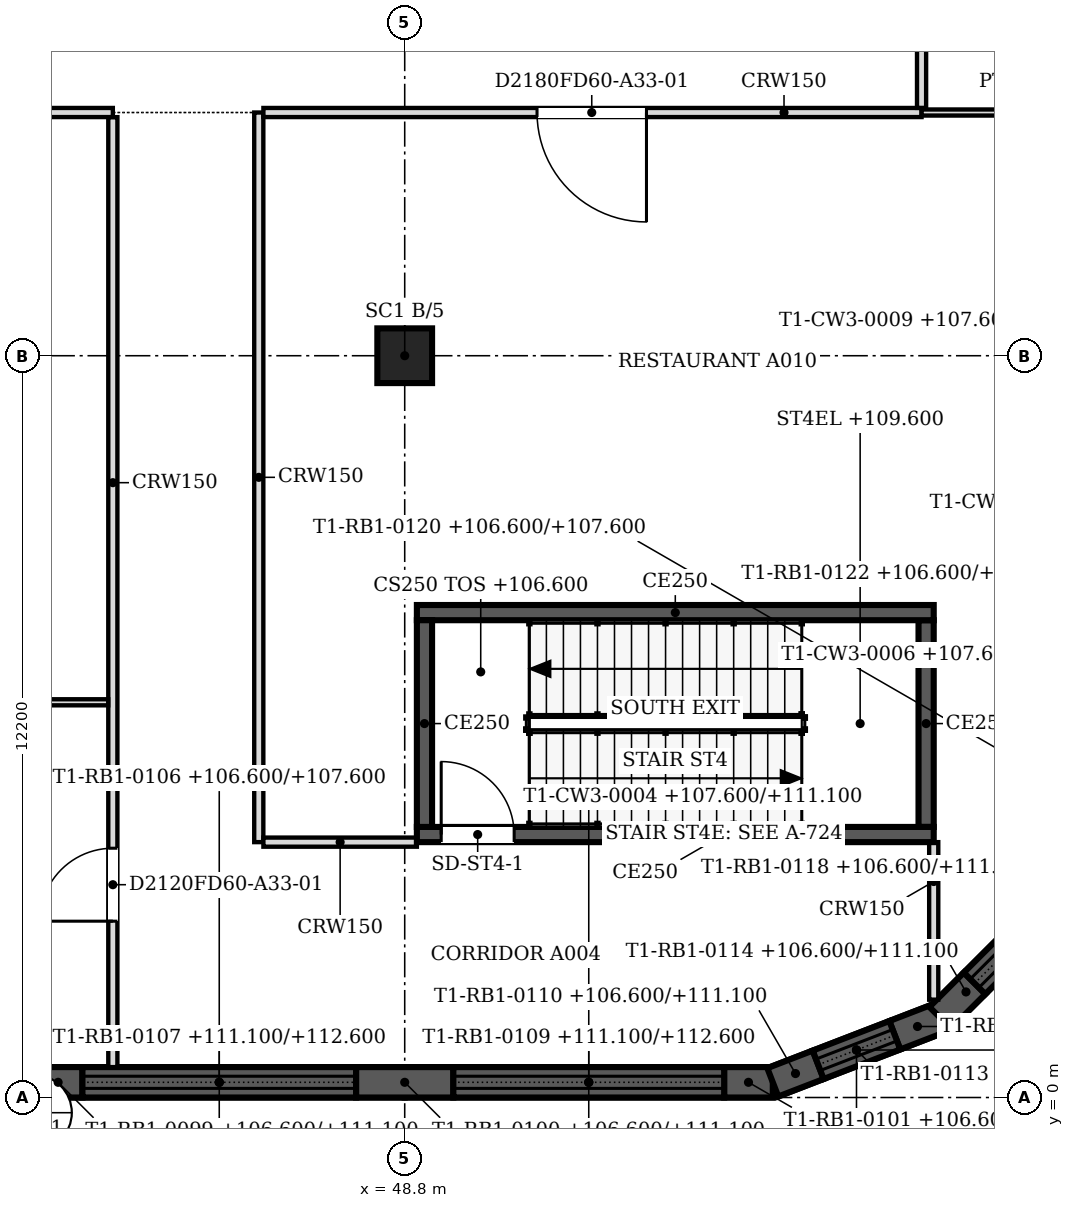
"""IFC4 building model, lengths in metres.
Left out: names, types, materials, properties, quantities, classifications, styles, units other than length and angle.
Written with IfcOpenShell. Run it as: python <this file> out.ifc"""

import sys

from ifc_helpers import new_model, si_unit, direction, frame, frame_2d, origin, origin_2d, place, context, subcontext, project, spatial, polyline, rectangle, outline, extrude, faceted_brep, source, transform, mapped, element, fill, save


model = new_model("IFC4")
c1 = context("Model", 3, precision=1e-05, world=origin(), true_north=direction((0.0, 1.0)))
c2 = subcontext(c1, "Body", "Model", "MODEL_VIEW")
j1 = project(units=[si_unit("LENGTHUNIT", "METRE"), si_unit("PLANEANGLEUNIT", "RADIAN")], contexts=[c1])
p1 = place(None, origin())
s1 = spatial("IfcSite", under=j1, at=p1, CompositionType="ELEMENT")
p2 = place(p1, origin())
s2 = spatial("IfcBuilding", under=s1, at=p2, CompositionType="ELEMENT")
p3 = place(p2, frame((0.0, 0.0, 106.6)))
s3 = spatial("IfcBuildingStorey", under=s2, at=p3, CompositionType="ELEMENT", Elevation=106.6)
p4 = place(p3, frame((48.8, 12.2, 0.0), z_axis=(0.0, 0.0, 1.0), x_axis=(1.0, 0.0, 0.0)))
e1 = element("IfcColumn", 1, at=p4, inside=s3, PredefinedType="COLUMN", context=c2, shape_type="SweptSolid", body=[
    extrude(rectangle(XDim=0.9, YDim=0.9, at=origin_2d()), origin(), (0.0, 0.0, 1.0), 5.8),
])
m1 = source(origin(), c2, "Body", "SweptSolid", [
    extrude(outline(polyline([(0.0, 0.0), (1.6, 0.0), (1.6, 4.5), (0.0, 4.5), (0.0, 0.0)])), frame((0.0, 0.25, 0.0), z_axis=(0.0, -1.0, 0.0), x_axis=(1.0, 0.0, 0.0)), (0.0, 0.0, 1.0), 0.5),
])
for number, where, z_axis, x_axis in (
    (2, (41.9, 0.25, 0.0), (0.0, 0.0, 1.0), (1.0, 0.0, 0.0)),
    (3, (48.0, 0.25, 0.0), (0.0, 0.0, 1.0), (1.0, 0.0, 0.0)),
):
    element("IfcWall", number, at=place(p3, frame(where, z_axis=z_axis, x_axis=x_axis)), inside=s3, PredefinedType="SOLIDWALL", context=c2, shape_type="MappedRepresentation", body=[
        mapped(m1, transform((0.0, 0.0, 0.0), scale=1.0)),
    ])
m2 = source(origin(), c2, "Body", "Brep", [
    faceted_brep([(0.0, -0.25, 0.0), (0.8, -0.25, 0.0), (0.8, -0.25, 4.5), (0.0, -0.25, 4.5), (0.0, 0.25, 4.5), (0.753, 0.25, 4.5), (0.753, 0.25, 0.0), (0.0, 0.25, 0.0), (0.8, -0.0, 0.0), (0.8, -0.0, 4.5)], [[[0, 1, 2, 3]], [[4, 5, 6, 7]], [[7, 6, 8, 1, 0]], [[9, 2, 1, 8]], [[5, 4, 3, 2, 9]], [[4, 7, 0, 3]], [[8, 6, 5, 9]]]),
])
p5 = place(p3, frame((54.053, 0.25, 0.0), z_axis=(0.0, 0.0, 1.0), x_axis=(1.0, 0.0, 0.0)))
e4 = element("IfcWall", 4, at=p5, inside=s3, PredefinedType="SOLIDWALL", context=c2, shape_type="MappedRepresentation", body=[
    mapped(m2, transform((0.0, 0.0, 0.0), scale=1.0)),
])
m3 = source(origin(), c2, "Body", "SweptSolid", [
    extrude(outline(polyline([(0.0, 0.0), (4.5, 0.0), (4.5, 1.0), (0.0, 1.0), (0.0, 0.0)])), frame((0.0, 0.25, 0.0), z_axis=(0.0, -1.0, 0.0), x_axis=(1.0, 0.0, 0.0)), (0.0, 0.0, 1.0), 0.5),
])
p6 = place(p3, frame((43.5, 0.25, 0.0), z_axis=(0.0, 0.0, 1.0), x_axis=(1.0, 0.0, 0.0)))
e5 = element("IfcWall", 5, at=p6, inside=s3, PredefinedType="SOLIDWALL", context=c2, shape_type="MappedRepresentation", body=[
    mapped(m3, transform((0.0, 0.0, 0.0), scale=1.0)),
])
m4 = source(origin(), c2, "Body", "SweptSolid", [
    extrude(outline(polyline([(0.0, 0.0), (6.1, 0.0), (6.1, 1.5), (0.0, 1.5), (0.0, 0.0)])), frame((0.0, 0.25, 0.0), z_axis=(0.0, -1.0, 0.0), x_axis=(1.0, 0.0, 0.0)), (0.0, 0.0, 1.0), 0.5),
])
p7 = place(p3, frame((42.7, 0.25, 4.5), z_axis=(0.0, 0.0, 1.0), x_axis=(1.0, 0.0, 0.0)))
e6 = element("IfcWall", 6, at=p7, inside=s3, PredefinedType="SOLIDWALL", context=c2, shape_type="MappedRepresentation", body=[
    mapped(m4, transform((0.0, 0.0, 0.0), scale=1.0)),
])
m5 = source(origin(), c2, "Body", "SweptSolid", [
    extrude(outline(polyline([(0.0, 0.0), (4.453, 0.0), (4.453, 1.0), (0.0, 1.0), (0.0, 0.0)])), frame((0.0, 0.25, 0.0), z_axis=(0.0, -1.0, 0.0), x_axis=(1.0, 0.0, 0.0)), (0.0, 0.0, 1.0), 0.5),
])
p8 = place(p3, frame((49.6, 0.25, 0.0), z_axis=(0.0, 0.0, 1.0), x_axis=(1.0, 0.0, 0.0)))
e7 = element("IfcWall", 7, at=p8, inside=s3, PredefinedType="SOLIDWALL", context=c2, shape_type="MappedRepresentation", body=[
    mapped(m5, transform((0.0, 0.0, 0.0), scale=1.0)),
])
m6 = source(origin(), c2, "Body", "Brep", [
    faceted_brep([(0.0, -0.25, 0.0), (6.053, -0.25, 0.0), (6.053, -0.25, 1.5), (0.0, -0.25, 1.5), (0.0, 0.25, 1.5), (6.007, 0.25, 1.5), (6.007, 0.25, 0.0), (0.0, 0.25, 0.0), (6.053, 0.0, 0.0), (6.053, 0.0, 1.5)], [[[0, 1, 2, 3]], [[4, 5, 6, 7]], [[7, 6, 8, 1, 0]], [[9, 2, 1, 8]], [[5, 4, 3, 2, 9]], [[4, 7, 0, 3]], [[8, 6, 5, 9]]]),
])
p9 = place(p3, frame((48.8, 0.25, 4.5), z_axis=(0.0, 0.0, 1.0), x_axis=(1.0, 0.0, 0.0)))
e8 = element("IfcWall", 8, at=p9, inside=s3, PredefinedType="SOLIDWALL", context=c2, shape_type="MappedRepresentation", body=[
    mapped(m6, transform((0.0, 0.0, 0.0), scale=1.0)),
])
m7 = source(origin(), c2, "Body", "Brep", [
    faceted_brep([(0.0, -0.25, 0.0), (0.8, -0.25, 0.0), (0.8, -0.25, 4.5), (0.0, -0.25, 4.5), (0.047, 0.25, 4.5), (0.8, 0.25, 4.5), (0.8, 0.25, 0.0), (0.047, 0.25, 0.0), (0.0, 0.0, 0.0), (0.0, 0.0, 4.5)], [[[0, 1, 2, 3]], [[4, 5, 6, 7]], [[7, 6, 1, 0, 8]], [[5, 4, 9, 3, 2]], [[8, 0, 3, 9]], [[7, 8, 9, 4]], [[1, 6, 5, 2]]]),
])
p10 = place(p3, frame((54.854, 0.25, 0.0), z_axis=(0.0, 0.0, 1.0), x_axis=(0.93301483327, 0.3598379092, 0.0)))
e9 = element("IfcWall", 9, at=p10, inside=s3, PredefinedType="SOLIDWALL", context=c2, shape_type="MappedRepresentation", body=[
    mapped(m7, transform((0.0, 0.0, 0.0), scale=1.0)),
])
m8 = source(origin(), c2, "Body", "Brep", [
    faceted_brep([(0.0, -0.25, 0.0), (0.8, -0.25, 0.0), (0.8, -0.25, 4.5), (0.0, -0.25, 4.5), (0.0, 0.25, 4.5), (0.747, 0.25, 4.5), (0.747, 0.25, 0.0), (0.0, 0.25, 0.0), (0.8, -0.0, 0.0), (0.8, -0.0, 4.5)], [[[0, 1, 2, 3]], [[4, 5, 6, 7]], [[7, 6, 8, 1, 0]], [[9, 2, 1, 8]], [[5, 4, 3, 2, 9]], [[4, 7, 0, 3]], [[8, 6, 5, 9]]]),
])
p11 = place(p3, frame((56.86, 1.024, 0.0), z_axis=(0.0, 0.0, 1.0), x_axis=(0.932912338632, 0.360103552367, 0.0)))
e10 = element("IfcWall", 10, at=p11, inside=s3, PredefinedType="SOLIDWALL", context=c2, shape_type="MappedRepresentation", body=[
    mapped(m8, transform((0.0, 0.0, 0.0), scale=1.0)),
])
m9 = source(origin(), c2, "Body", "SweptSolid", [
    extrude(outline(polyline([(0.0, 0.0), (1.351, 0.0), (1.351, 1.0), (0.0, 1.0), (0.0, 0.0)])), frame((0.0, 0.25, 0.0), z_axis=(0.0, -1.0, 0.0), x_axis=(1.0, 0.0, 0.0)), (0.0, 0.0, 1.0), 0.5),
])
p12 = place(p3, frame((55.6, 0.538, 0.0), z_axis=(0.0, 0.0, 1.0), x_axis=(0.932981713512, 0.359923772835, 0.0)))
e11 = element("IfcWall", 11, at=p12, inside=s3, PredefinedType="SOLIDWALL", context=c2, shape_type="MappedRepresentation", body=[
    mapped(m9, transform((0.0, 0.0, 0.0), scale=1.0)),
])
m10 = source(origin(), c2, "Body", "Brep", [
    faceted_brep([(0.0, -0.25, 0.0), (2.95, -0.25, 0.0), (2.95, -0.25, 1.5), (0.0, -0.25, 1.5), (0.047, 0.25, 1.5), (2.898, 0.25, 1.5), (2.898, 0.25, 0.0), (0.047, 0.25, 0.0), (2.95, 0.0, 0.0), (0.0, 0.0, 0.0), (2.95, 0.0, 1.5), (0.0, 0.0, 1.5)], [[[0, 1, 2, 3]], [[4, 5, 6, 7]], [[7, 6, 8, 1, 0, 9]], [[10, 2, 1, 8]], [[5, 4, 11, 3, 2, 10]], [[9, 0, 3, 11]], [[7, 9, 11, 4]], [[8, 6, 5, 10]]]),
])
p13 = place(p3, frame((54.854, 0.25, 4.5), z_axis=(0.0, 0.0, 1.0), x_axis=(0.932999673775, 0.359877213415, 0.0)))
e12 = element("IfcWall", 12, at=p13, inside=s3, PredefinedType="SOLIDWALL", context=c2, shape_type="MappedRepresentation", body=[
    mapped(m10, transform((0.0, 0.0, 0.0), scale=1.0)),
])
m11 = source(origin(), c2, "Body", "Brep", [
    faceted_brep([(0.0, -0.25, 0.0), (0.8, -0.25, 0.0), (0.8, -0.25, 4.5), (0.0, -0.25, 4.5), (0.053, 0.25, 4.5), (0.8, 0.25, 4.5), (0.8, 0.25, 0.0), (0.053, 0.25, 0.0), (0.0, 0.0, 0.0), (0.0, 0.0, 4.5)], [[[0, 1, 2, 3]], [[4, 5, 6, 7]], [[7, 6, 1, 0, 8]], [[5, 4, 9, 3, 2]], [[8, 0, 3, 9]], [[7, 8, 9, 4]], [[1, 6, 5, 2]]]),
])
p14 = place(p3, frame((57.606, 1.312, 0.0), z_axis=(0.0, 0.0, 1.0), x_axis=(0.707106781187, 0.707106781187, 0.0)))
e13 = element("IfcWall", 13, at=p14, inside=s3, PredefinedType="SOLIDWALL", context=c2, shape_type="MappedRepresentation", body=[
    mapped(m11, transform((0.0, 0.0, 0.0), scale=1.0)),
])
m12 = source(origin(), c2, "Body", "SweptSolid", [
    extrude(outline(polyline([(0.0, 0.0), (1.344, 0.0), (1.344, 1.0), (0.0, 1.0), (0.0, 0.0)])), frame((0.0, 0.25, 0.0), z_axis=(0.0, -1.0, 0.0), x_axis=(1.0, 0.0, 0.0)), (0.0, 0.0, 1.0), 0.5),
])
p15 = place(p3, frame((58.172, 1.878, 0.0), z_axis=(0.0, 0.0, 1.0), x_axis=(0.707106781187, 0.707106781187, 0.0)))
e14 = element("IfcWall", 14, at=p15, inside=s3, PredefinedType="SOLIDWALL", context=c2, shape_type="MappedRepresentation", body=[
    mapped(m12, transform((0.0, 0.0, 0.0), scale=1.0)),
])
m13 = source(origin(), c2, "Body", "Brep", [
    faceted_brep([(0.0, -0.25, 0.0), (2.944, -0.25, 0.0), (2.944, -0.25, 1.5), (0.0, -0.25, 1.5), (0.053, 0.25, 1.5), (2.891, 0.25, 1.5), (2.891, 0.25, 0.0), (0.053, 0.25, 0.0), (2.944, 0.0, 0.0), (0.0, 0.0, 0.0), (2.944, 0.0, 1.5), (0.0, 0.0, 1.5)], [[[0, 1, 2, 3]], [[4, 5, 6, 7]], [[7, 6, 8, 1, 0, 9]], [[10, 2, 1, 8]], [[5, 4, 11, 3, 2, 10]], [[9, 0, 3, 11]], [[7, 9, 11, 4]], [[8, 6, 5, 10]]]),
])
p16 = place(p3, frame((57.606, 1.312, 4.5), z_axis=(0.0, 0.0, 1.0), x_axis=(0.707106781187, 0.707106781187, 0.0)))
e15 = element("IfcWall", 15, at=p16, inside=s3, PredefinedType="SOLIDWALL", context=c2, shape_type="MappedRepresentation", body=[
    mapped(m13, transform((0.0, 0.0, 0.0), scale=1.0)),
])
p17 = place(p3, frame((57.5, 4.325, 0.0), z_axis=(0.0, 0.0, 1.0), x_axis=(-1.0, 0.0, 0.0)))
e16 = element("IfcWall", 16, at=p17, inside=s3, PredefinedType="SOLIDWALL", context=c2, shape_type="SweptSolid", body=[
    extrude(rectangle(XDim=8.5, YDim=0.25, at=frame_2d((4.25, 0.0))), origin(), (0.0, 0.0, 1.0), 6.0),
])
m14 = source(origin(), c2, "Body", "SweptSolid", [
    extrude(rectangle(XDim=1.2, YDim=2.1, at=frame_2d((0.6, 1.05))), frame((0.0, 0.135, 0.0), z_axis=(0.0, -1.0, 0.0), x_axis=(1.0, 0.0, 0.0)), (0.0, 0.0, 1.0), 0.27),
])
p18 = place(p17, frame((6.9, 0.0, 0.0)))
e17 = element("IfcOpeningElement", 17, at=p18, cuts=e16, PredefinedType="OPENING", context=c2, shape_type="MappedRepresentation", body=[
    mapped(m14, transform((0.0, 0.0, 0.0), scale=1.0)),
])
p19 = place(p3, frame((49.125, 4.45, 0.0), z_axis=(0.0, 0.0, 1.0), x_axis=(0.0, 1.0, 0.0)))
e18 = element("IfcWall", 18, at=p19, inside=s3, PredefinedType="SOLIDWALL", context=c2, shape_type="SweptSolid", body=[
    extrude(rectangle(XDim=3.4, YDim=0.25, at=frame_2d((1.7, 0.0))), origin(), (0.0, 0.0, 1.0), 6.0),
])
p20 = place(p3, frame((49.0, 7.975, 0.0), z_axis=(0.0, 0.0, 1.0), x_axis=(1.0, 0.0, 0.0)))
e19 = element("IfcWall", 19, at=p20, inside=s3, PredefinedType="SOLIDWALL", context=c2, shape_type="SweptSolid", body=[
    extrude(rectangle(XDim=8.5, YDim=0.25, at=frame_2d((4.25, 0.0))), origin(), (0.0, 0.0, 1.0), 6.0),
])
p21 = place(p3, frame((57.375, 7.85, 0.0), z_axis=(0.0, 0.0, 1.0), x_axis=(0.0, -1.0, 0.0)))
e20 = element("IfcWall", 20, at=p21, inside=s3, PredefinedType="SOLIDWALL", context=c2, shape_type="SweptSolid", body=[
    extrude(rectangle(XDim=3.4, YDim=0.25, at=frame_2d((1.7, 0.0))), origin(), (0.0, 0.0, 1.0), 6.0),
])
p22 = place(p3, frame((44.0, 0.5, 0.0), z_axis=(0.0, 0.0, 1.0), x_axis=(0.0, 1.0, 0.0)))
e21 = element("IfcWall", 21, at=p22, inside=s3, PredefinedType="PARTITIONING", context=c2, shape_type="SweptSolid", body=[
    extrude(rectangle(XDim=15.624, YDim=0.15, at=frame_2d((7.812, 0.0))), origin(), (0.0, 0.0, 1.0), 5.167),
])
m15 = source(origin(), c2, "Body", "SweptSolid", [
    extrude(rectangle(XDim=1.2, YDim=2.1, at=frame_2d((0.6, 1.05))), frame((0.0, 0.085, 0.0), z_axis=(0.0, -1.0, 0.0), x_axis=(1.0, 0.0, 0.0)), (0.0, 0.0, 1.0), 0.17),
])
p23 = place(p22, frame((2.4, 0.0, 0.0)))
e22 = element("IfcOpeningElement", 22, at=p23, cuts=e21, PredefinedType="OPENING", context=c2, shape_type="MappedRepresentation", body=[
    mapped(m15, transform((0.0, 0.0, 0.0), scale=1.0)),
])
p24 = place(p3, frame((57.5, 1.609, 0.0), z_axis=(0.0, 0.0, 1.0), x_axis=(0.0, 1.0, 0.0)))
e23 = element("IfcWall", 23, at=p24, inside=s3, PredefinedType="PARTITIONING", context=c2, shape_type="SweptSolid", body=[
    extrude(rectangle(XDim=2.591, YDim=0.15, at=frame_2d((1.295, 0.0))), origin(), (0.0, 0.0, 1.0), 5.167),
])
p25 = place(p3, frame((46.4, 4.2, 0.0), z_axis=(0.0, 0.0, 1.0), x_axis=(0.0, 1.0, 0.0)))
e24 = element("IfcWall", 24, at=p25, inside=s3, PredefinedType="PARTITIONING", context=c2, shape_type="SweptSolid", body=[
    extrude(rectangle(XDim=12.0, YDim=0.15, at=frame_2d((6.0, 0.0))), origin(), (0.0, 0.0, 1.0), 5.167),
])
p26 = place(p3, frame((46.476, 4.2, 0.0), z_axis=(0.0, 0.0, 1.0), x_axis=(1.0, 0.0, 0.0)))
e25 = element("IfcWall", 25, at=p26, inside=s3, PredefinedType="PARTITIONING", context=c2, shape_type="SweptSolid", body=[
    extrude(rectangle(XDim=2.524, YDim=0.15, at=frame_2d((1.262, 0.0))), origin(), (0.0, 0.0, 1.0), 5.167),
])
p27 = place(p3, frame((24.9, 6.5, 0.0), z_axis=(0.0, 0.0, 1.0), x_axis=(1.0, 0.0, 0.0)))
e26 = element("IfcWall", 26, at=p27, inside=s3, PredefinedType="PARTITIONING", context=c2, shape_type="SweptSolid", body=[
    extrude(rectangle(XDim=19.024, YDim=0.1, at=frame_2d((9.512, 0.0))), origin(), (0.0, 0.0, 1.0), 5.167),
])
p28 = place(p3, frame((44.0, 16.2, 0.0), z_axis=(0.0, 0.0, 1.0), x_axis=(-1.0, 0.0, 0.0)))
e27 = element("IfcWall", 27, at=p28, inside=s3, PredefinedType="PARTITIONING", context=c2, shape_type="SweptSolid", body=[
    extrude(rectangle(XDim=13.5, YDim=0.15, at=frame_2d((6.75, 0.0))), origin(), (0.0, 0.0, 1.0), 5.167),
])
m16 = source(origin(), c2, "Body", "SweptSolid", [
    extrude(rectangle(XDim=1.8, YDim=2.1, at=frame_2d((0.9, 1.05))), frame((0.0, 0.085, 0.0), z_axis=(0.0, -1.0, 0.0), x_axis=(1.0, 0.0, 0.0)), (0.0, 0.0, 1.0), 0.17),
])
p29 = place(p28, frame((5.9, 0.0, 0.0)))
e28 = element("IfcOpeningElement", 28, at=p29, cuts=e27, PredefinedType="OPENING", context=c2, shape_type="MappedRepresentation", body=[
    mapped(m16, transform((0.0, 0.0, 0.0), scale=1.0)),
])
p30 = place(p3, frame((57.3, 16.2, 0.0), z_axis=(0.0, 0.0, 1.0), x_axis=(-1.0, 0.0, 0.0)))
e29 = element("IfcWall", 29, at=p30, inside=s3, PredefinedType="PARTITIONING", context=c2, shape_type="SweptSolid", body=[
    extrude(rectangle(XDim=10.824, YDim=0.15, at=frame_2d((5.412, 0.0))), origin(), (0.0, 0.0, 1.0), 5.167),
])
p31 = place(p30, frame((4.524, 0.0, 0.0)))
e30 = element("IfcOpeningElement", 30, at=p31, cuts=e29, PredefinedType="OPENING", context=c2, shape_type="MappedRepresentation", body=[
    mapped(m16, transform((0.0, 0.0, 0.0), scale=1.0)),
])
p32 = place(p3, frame((57.301, 16.2, 0.0), z_axis=(0.0, 0.0, 1.0), x_axis=(1.0, 0.0, 0.0)))
e31 = element("IfcWall", 31, at=p32, inside=s3, PredefinedType="PARTITIONING", context=c2, shape_type="SweptSolid", body=[
    extrude(rectangle(XDim=3.199, YDim=0.1, at=frame_2d((1.6, 0.0))), origin(), (0.0, 0.0, 1.0), 5.167),
])
p33 = place(p3, frame((57.3, 30.6, 0.0), z_axis=(0.0, 0.0, 1.0), x_axis=(0.0, -1.0, 0.0)))
e32 = element("IfcWall", 32, at=p33, inside=s3, PredefinedType="PARTITIONING", context=c2, shape_type="SweptSolid", body=[
    extrude(rectangle(XDim=14.324, YDim=0.15, at=frame_2d((7.162, 0.0))), origin(), (0.0, 0.0, 1.0), 5.167),
])
m17 = source(origin(), c2, "Body", "SweptSolid", [
    extrude(rectangle(XDim=0.9, YDim=2.1, at=frame_2d((0.45, 1.05))), frame((0.0, 0.085, 0.0), z_axis=(0.0, -1.0, 0.0), x_axis=(1.0, 0.0, 0.0)), (0.0, 0.0, 1.0), 0.17),
])
p34 = place(p33, frame((2.699, 0.0, 0.0)))
e33 = element("IfcOpeningElement", 33, at=p34, cuts=e32, PredefinedType="OPENING", context=c2, shape_type="MappedRepresentation", body=[
    mapped(m17, transform((0.0, 0.0, 0.0), scale=1.0)),
])
p35 = place(p33, frame((9.824, 0.0, 0.0)))
e34 = element("IfcOpeningElement", 34, at=p35, cuts=e32, PredefinedType="OPENING", context=c2, shape_type="MappedRepresentation", body=[
    mapped(m17, transform((0.0, 0.0, 0.0), scale=1.0)),
])
m18 = source(origin(), c2, "Body", "SweptSolid", [
    extrude(rectangle(XDim=1.2, YDim=2.1, at=frame_2d((0.6, 1.05))), frame((0.0, 0.025, 0.0), z_axis=(0.0, -1.0, 0.0), x_axis=(1.0, 0.0, 0.0)), (0.0, 0.0, 1.0), 0.05),
])
p36 = place(p18, origin())
e35 = element("IfcDoor", 35, at=p36, inside=s3, OperationType="SINGLE_SWING_RIGHT", PredefinedType="DOOR", context=c2, shape_type="MappedRepresentation", body=[
    mapped(m18, transform((0.0, 0.0, 0.0), scale=1.0)),
])
fill(e17, e35)
p37 = place(p23, origin())
e36 = element("IfcDoor", 36, at=p37, inside=s3, OperationType="SINGLE_SWING_LEFT", PredefinedType="DOOR", context=c2, shape_type="MappedRepresentation", body=[
    mapped(m18, transform((0.0, 0.0, 0.0), scale=1.0)),
])
fill(e22, e36)
m19 = source(origin(), c2, "Body", "SweptSolid", [
    extrude(rectangle(XDim=1.8, YDim=2.1, at=frame_2d((0.9, 1.05))), frame((0.0, 0.025, 0.0), z_axis=(0.0, -1.0, 0.0), x_axis=(1.0, 0.0, 0.0)), (0.0, 0.0, 1.0), 0.05),
])
p38 = place(p31, origin())
e37 = element("IfcDoor", 37, at=p38, inside=s3, OperationType="DOUBLE_DOOR_SINGLE_SWING", PredefinedType="DOOR", context=c2, shape_type="MappedRepresentation", body=[
    mapped(m19, transform((0.0, 0.0, 0.0), scale=1.0)),
])
fill(e30, e37)
save(model, sys.argv[1])
